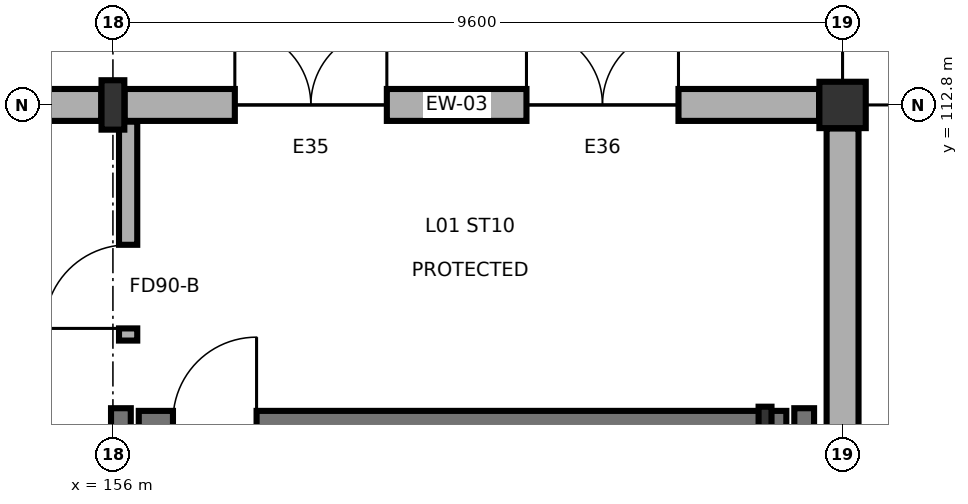
"""IFC4 building model, lengths in metres.
Left out: names, types, materials, properties, quantities, classifications, styles, units other than length and angle.
Written with IfcOpenShell. Run it as: python <this file> out.ifc"""

import sys

from ifc_helpers import new_model, si_unit, direction, frame, frame_2d, origin, origin_2d, place, context, subcontext, project, spatial, rectangle, hollow_circle, i_section, extrude, element, fill, save


model = new_model("IFC4")
c1 = context("Model", 3, precision=1e-05, world=origin(), true_north=direction((0.0, 1.0)))
c2 = subcontext(c1, "Body", "Model", "MODEL_VIEW")
j1 = project(units=[si_unit("LENGTHUNIT", "METRE"), si_unit("PLANEANGLEUNIT", "RADIAN")], contexts=[c1])
p1 = place(None, origin())
s1 = spatial("IfcSite", under=j1, at=p1, CompositionType="ELEMENT")
p2 = place(p1, origin())
s2 = spatial("IfcBuilding", under=s1, at=p2, CompositionType="ELEMENT")
p3 = place(p2, origin())
s3 = spatial("IfcBuildingStorey", under=s2, at=p3, CompositionType="ELEMENT", Elevation=0.0)
p4 = place(p3, frame((156.0, 112.8, 0.0), z_axis=(0.0, 0.0, 1.0), x_axis=(1.0, 0.0, 0.0)))
e1 = element("IfcColumn", 1, at=p4, inside=s3, PredefinedType="COLUMN", context=c2, shape_type="SweptSolid", body=[
    extrude(i_section(OverallWidth=0.3, OverallDepth=0.65, WebThickness=0.016, FlangeThickness=0.031, FilletRadius=0.027, at=origin_2d()), origin(), (0.0, 0.0, 1.0), 5.4),
])
p5 = place(p3, frame((165.6, 112.8, 0.0), z_axis=(0.0, 0.0, 1.0), x_axis=(1.0, 0.0, 0.0)))
e2 = element("IfcColumn", 2, at=p5, inside=s3, PredefinedType="COLUMN", context=c2, shape_type="SweptSolid", body=[
    extrude(hollow_circle(Radius=0.305, WallThickness=0.025, at=origin_2d()), origin(), (0.0, 0.0, 1.0), 5.4),
])
p6 = place(p3, frame((164.58, 108.65, 0.0), z_axis=(0.0, 0.0, 1.0), x_axis=(1.0, 0.0, 0.0)))
e3 = element("IfcColumn", 3, at=p6, inside=s3, PredefinedType="PILASTER", context=c2, shape_type="SweptSolid", body=[
    extrude(i_section(OverallWidth=0.17, OverallDepth=0.36, WebThickness=0.008, FlangeThickness=0.013, FilletRadius=0.018, at=origin_2d()), origin(), (0.0, 0.0, 1.0), 5.4),
])
p7 = place(p3, frame((146.554, 112.8, 0.0), z_axis=(0.0, 0.0, 1.0), x_axis=(1.0, 0.0, 0.0)))
e4 = element("IfcWall", 4, at=p7, inside=s3, PredefinedType="SOLIDWALL", context=c2, shape_type="SweptSolid", body=[
    extrude(rectangle(XDim=9.292, YDim=0.42, at=frame_2d((4.646, 0.0))), origin(), (0.0, 0.0, 1.0), 4.685),
])
p8 = place(p7, frame((1.923, 0.0, 0.75)))
e5 = element("IfcOpeningElement", 5, at=p8, cuts=e4, PredefinedType="OPENING", context=c2, shape_type="SweptSolid", body=[
    extrude(rectangle(XDim=1.95, YDim=1.65, at=frame_2d((0.975, 0.825))), frame((0.0, 0.22, 0.0), z_axis=(0.0, -1.0, 0.0), x_axis=(1.0, 0.0, 0.0)), (0.0, 0.0, 1.0), 0.44),
])
p9 = place(p7, frame((5.419, 0.0, 0.75)))
e6 = element("IfcOpeningElement", 6, at=p9, cuts=e4, PredefinedType="OPENING", context=c2, shape_type="SweptSolid", body=[
    extrude(rectangle(XDim=1.95, YDim=1.65, at=frame_2d((0.975, 0.825))), frame((0.0, 0.22, 0.0), z_axis=(0.0, -1.0, 0.0), x_axis=(1.0, 0.0, 0.0)), (0.0, 0.0, 1.0), 0.44),
])
p10 = place(p3, frame((156.154, 112.8, 0.0), z_axis=(0.0, 0.0, 1.0), x_axis=(1.0, 0.0, 0.0)))
e7 = element("IfcWall", 7, at=p10, inside=s3, PredefinedType="SOLIDWALL", context=c2, shape_type="SweptSolid", body=[
    extrude(rectangle(XDim=9.137, YDim=0.42, at=frame_2d((4.568, 0.0))), origin(), (0.0, 0.0, 1.0), 4.685),
])
p11 = place(p10, frame((1.45, 0.0, 0.0)))
e8 = element("IfcOpeningElement", 8, at=p11, cuts=e7, PredefinedType="OPENING", context=c2, shape_type="SweptSolid", body=[
    extrude(rectangle(XDim=2.0, YDim=2.3, at=frame_2d((1.0, 1.15))), frame((0.0, 0.22, 0.0), z_axis=(0.0, -1.0, 0.0), x_axis=(1.0, 0.0, 0.0)), (0.0, 0.0, 1.0), 0.44),
])
p12 = place(p10, frame((5.287, 0.0, 0.0)))
e9 = element("IfcOpeningElement", 9, at=p12, cuts=e7, PredefinedType="OPENING", context=c2, shape_type="SweptSolid", body=[
    extrude(rectangle(XDim=2.0, YDim=2.3, at=frame_2d((1.0, 1.15))), frame((0.0, 0.22, 0.0), z_axis=(0.0, -1.0, 0.0), x_axis=(1.0, 0.0, 0.0)), (0.0, 0.0, 1.0), 0.44),
])
p13 = place(p3, frame((165.6, 103.529, 0.0), z_axis=(0.0, 0.0, 1.0), x_axis=(0.0, 1.0, 0.0)))
e10 = element("IfcWall", 10, at=p13, inside=s3, PredefinedType="SOLIDWALL", context=c2, shape_type="SweptSolid", body=[
    extrude(rectangle(XDim=8.962, YDim=0.42, at=frame_2d((4.481, 0.0))), origin(), (0.0, 0.0, 1.0), 4.625),
])
for number, where, z_axis, x_axis in (
    (11, (156.105, 104.54, 0.0), (0.0, 0.0, 1.0), (0.0, 1.0, 0.0)),
    (12, (165.095, 104.54, 0.0), (0.0, 0.0, 1.0), (0.0, 1.0, 0.0)),
):
    element("IfcWall", number, at=place(p3, frame(where, z_axis=z_axis, x_axis=x_axis)), inside=s3, PredefinedType="SHEAR", context=c2, shape_type="SweptSolid", body=[
        extrude(rectangle(XDim=4.27, YDim=0.26, at=frame_2d((2.135, 0.0))), origin(), (0.0, 0.0, 1.0), 5.14),
    ])
p14 = place(p3, frame((156.34, 108.645, 0.0), z_axis=(0.0, 0.0, 1.0), x_axis=(1.0, 0.0, 0.0)))
e13 = element("IfcWall", 13, at=p14, inside=s3, PredefinedType="SHEAR", context=c2, shape_type="SweptSolid", body=[
    extrude(rectangle(XDim=8.52, YDim=0.26, at=frame_2d((4.26, 0.0))), origin(), (0.0, 0.0, 1.0), 5.14),
])
p15 = place(p14, frame((0.45, 0.0, 0.0)))
e14 = element("IfcOpeningElement", 14, at=p15, cuts=e13, PredefinedType="OPENING", context=c2, shape_type="SweptSolid", body=[
    extrude(rectangle(XDim=1.1, YDim=2.2, at=frame_2d((0.55, 1.1))), frame((0.0, 0.14, 0.0), z_axis=(0.0, -1.0, 0.0), x_axis=(1.0, 0.0, 0.0)), (0.0, 0.0, 1.0), 0.28),
])
p16 = place(p3, frame((156.2, 109.7, 0.0), z_axis=(0.0, 0.0, 1.0), x_axis=(0.0, 1.0, 0.0)))
e15 = element("IfcWall", 15, at=p16, inside=s3, PredefinedType="SOLIDWALL", context=c2, shape_type="SweptSolid", body=[
    extrude(rectangle(XDim=2.88, YDim=0.24, at=frame_2d((1.44, 0.0))), origin(), (0.0, 0.0, 1.0), 5.14),
])
p17 = place(p16, frame((0.16, 0.0, 0.0)))
e16 = element("IfcOpeningElement", 16, at=p17, cuts=e15, PredefinedType="OPENING", context=c2, shape_type="SweptSolid", body=[
    extrude(rectangle(XDim=1.1, YDim=2.2, at=frame_2d((0.55, 1.1))), frame((0.0, 0.13, 0.0), z_axis=(0.0, -1.0, 0.0), x_axis=(1.0, 0.0, 0.0)), (0.0, 0.0, 1.0), 0.26),
])
p18 = place(p11, origin())
e17 = element("IfcDoor", 17, at=p18, inside=s3, OperationType="DOUBLE_DOOR_SINGLE_SWING", PredefinedType="DOOR", context=c2, shape_type="SweptSolid", body=[
    extrude(rectangle(XDim=2.0, YDim=2.3, at=frame_2d((1.0, 1.15))), frame((0.0, 0.025, 0.0), z_axis=(0.0, -1.0, 0.0), x_axis=(1.0, 0.0, 0.0)), (0.0, 0.0, 1.0), 0.05),
])
fill(e8, e17)
p19 = place(p12, origin())
e18 = element("IfcDoor", 18, at=p19, inside=s3, OperationType="DOUBLE_DOOR_SINGLE_SWING", PredefinedType="DOOR", context=c2, shape_type="SweptSolid", body=[
    extrude(rectangle(XDim=2.0, YDim=2.3, at=frame_2d((1.0, 1.15))), frame((0.0, 0.025, 0.0), z_axis=(0.0, -1.0, 0.0), x_axis=(1.0, 0.0, 0.0)), (0.0, 0.0, 1.0), 0.05),
])
fill(e9, e18)
p20 = place(p15, origin())
e19 = element("IfcDoor", 19, at=p20, inside=s3, OperationType="SINGLE_SWING_RIGHT", PredefinedType="DOOR", context=c2, shape_type="SweptSolid", body=[
    extrude(rectangle(XDim=1.1, YDim=2.2, at=frame_2d((0.55, 1.1))), frame((0.0, 0.025, 0.0), z_axis=(0.0, -1.0, 0.0), x_axis=(1.0, 0.0, 0.0)), (0.0, 0.0, 1.0), 0.05),
])
fill(e14, e19)
p21 = place(p17, origin())
e20 = element("IfcDoor", 20, at=p21, inside=s3, OperationType="SINGLE_SWING_LEFT", PredefinedType="DOOR", context=c2, shape_type="SweptSolid", body=[
    extrude(rectangle(XDim=1.1, YDim=2.2, at=frame_2d((0.55, 1.1))), frame((0.0, 0.025, 0.0), z_axis=(0.0, -1.0, 0.0), x_axis=(1.0, 0.0, 0.0)), (0.0, 0.0, 1.0), 0.05),
])
fill(e16, e20)
save(model, sys.argv[1])
